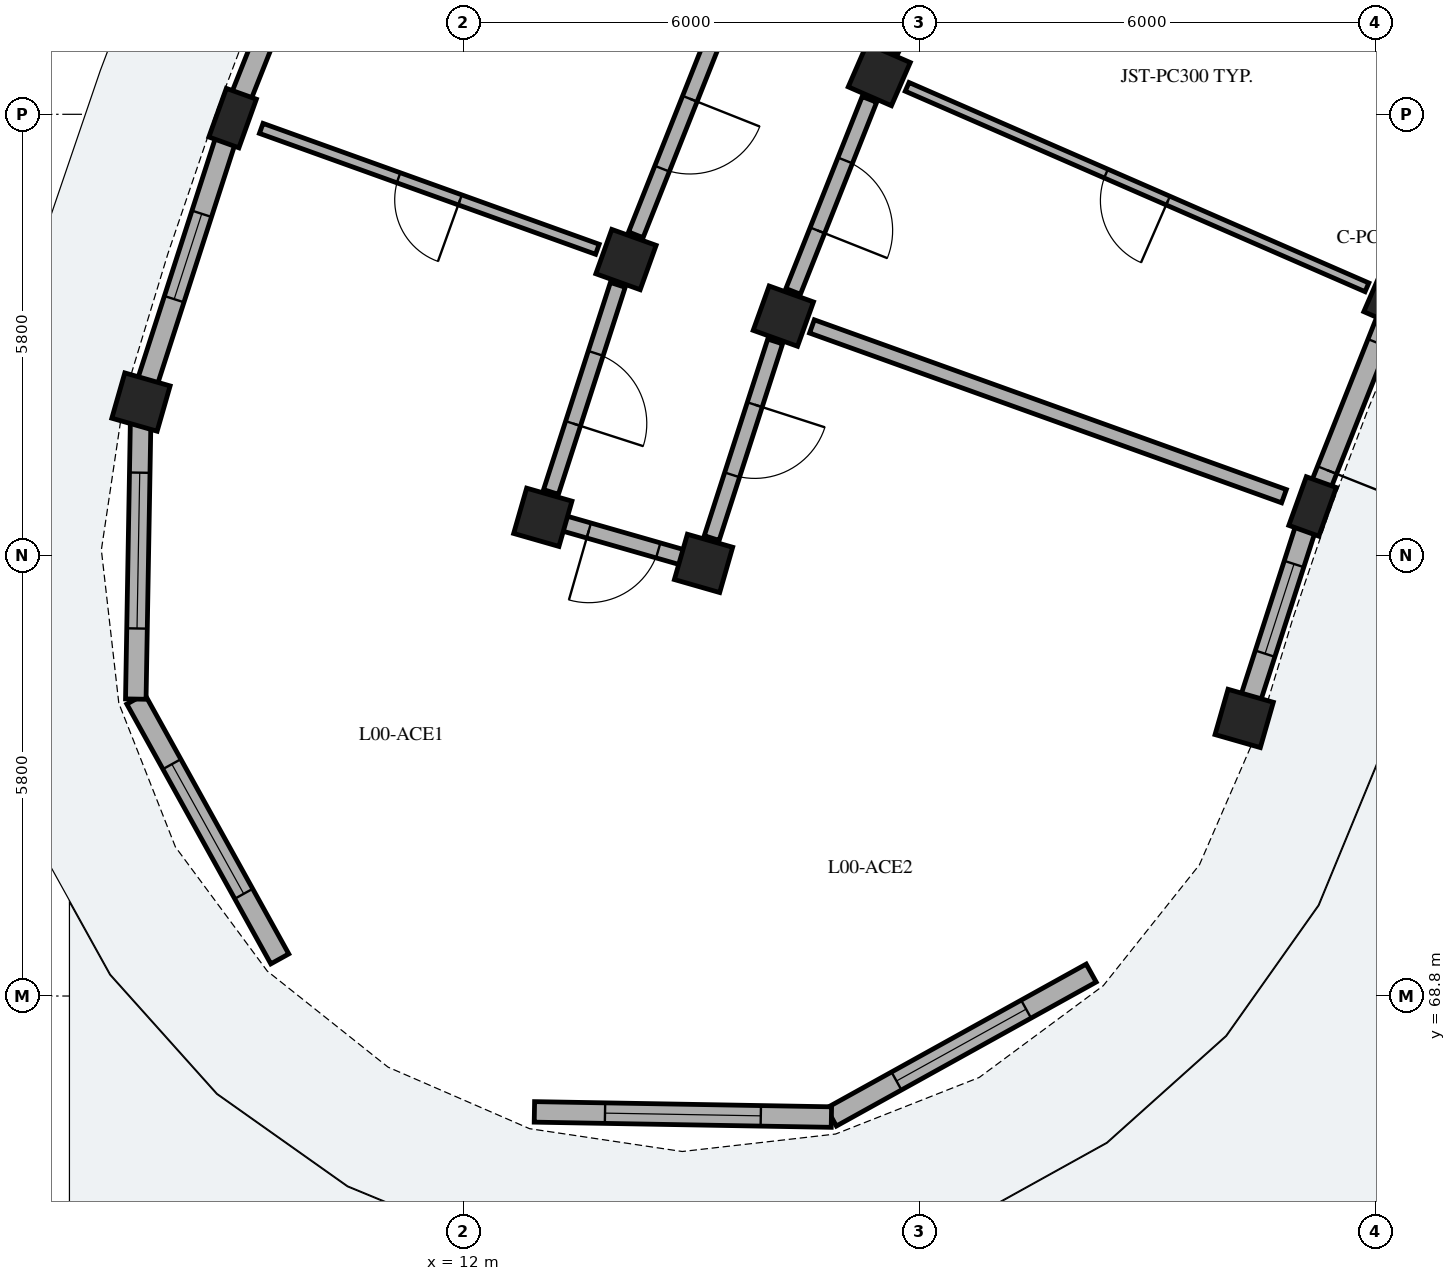
"""IFC4 building model, lengths in metres.
Left out: names, types, materials, properties, quantities, classifications, styles, units other than length and angle.
Written with IfcOpenShell. Run it as: python <this file> out.ifc"""

import sys

from ifc_helpers import new_model, si_unit, direction, frame, frame_2d, origin, origin_2d, place, context, subcontext, project, spatial, rectangle, extrude, element, fill, save


model = new_model("IFC4")
c1 = context("Model", 3, precision=1e-05, world=origin(), true_north=direction((0.0, 1.0)))
c2 = subcontext(c1, "Body", "Model", "MODEL_VIEW")
j1 = project(units=[si_unit("LENGTHUNIT", "METRE"), si_unit("PLANEANGLEUNIT", "RADIAN")], contexts=[c1])
p1 = place(None, origin())
s1 = spatial("IfcSite", under=j1, at=p1, CompositionType="ELEMENT")
p2 = place(p1, origin())
s2 = spatial("IfcBuilding", under=s1, at=p2, CompositionType="ELEMENT")
p3 = place(p2, origin())
s3 = spatial("IfcBuildingStorey", under=s2, at=p3, CompositionType="ELEMENT", Elevation=0.0)
for number, where, z_axis, x_axis in (
    (1, (24.254, 77.964, 0.0), (0.0, 0.0, 1.0), (-0.917, 0.4, 0.0)),
    (2, (17.47, 80.921, 0.0), (0.0, 0.0, 1.0), (-0.917, 0.4, 0.0)),
):
    element("IfcColumn", number, at=place(p3, frame(where, z_axis=z_axis, x_axis=x_axis)), inside=s3, PredefinedType="COLUMN", context=c2, shape_type="SweptSolid", body=[
        extrude(rectangle(XDim=0.62, YDim=0.62, at=origin_2d()), origin(), (0.0, 0.0, 1.0), 4.485),
    ])
p4 = place(p3, frame((23.172, 75.241, 0.0), z_axis=(0.0, 0.0, 1.0), x_axis=(-0.941012100316, 0.338372911236, 0.0)))
e3 = element("IfcColumn", 3, at=p4, inside=s3, PredefinedType="PILASTER", context=c2, shape_type="SweptSolid", body=[
    extrude(rectangle(XDim=0.42, YDim=0.68, at=origin_2d()), origin(), (0.0, 0.0, 1.0), 4.485),
])
for number, where, z_axis, x_axis in (
    (4, (16.208, 77.745, 0.0), (0.0, 0.0, 1.0), (-0.941, 0.338, 0.0)),
    (5, (14.138, 78.489, 0.0), (0.0, 0.0, 1.0), (-0.941, 0.338, 0.0)),
):
    element("IfcColumn", number, at=place(p3, frame(where, z_axis=z_axis, x_axis=x_axis)), inside=s3, PredefinedType="COLUMN", context=c2, shape_type="SweptSolid", body=[
        extrude(rectangle(XDim=0.62, YDim=0.62, at=origin_2d()), origin(), (0.0, 0.0, 1.0), 4.485),
    ])
p5 = place(p3, frame((8.963, 80.35, 0.0), z_axis=(0.0, 0.0, 1.0), x_axis=(-0.941012100316, 0.338372911236, 0.0)))
e6 = element("IfcColumn", 6, at=p5, inside=s3, PredefinedType="PILASTER", context=c2, shape_type="SweptSolid", body=[
    extrude(rectangle(XDim=0.42, YDim=0.68, at=origin_2d()), origin(), (0.0, 0.0, 1.0), 4.485),
])
for number, where, z_axis, x_axis in (
    (7, (22.272, 72.452, 0.0), (0.0, 0.0, 1.0), (-0.961, 0.276, 0.0)),
    (8, (15.159, 74.492, 0.0), (0.0, 0.0, 1.0), (-0.961, 0.276, 0.0)),
    (9, (13.044, 75.098, 0.0), (0.0, 0.0, 1.0), (-0.961, 0.276, 0.0)),
    (10, (7.757, 76.614, 0.0), (0.0, 0.0, 1.0), (-0.961, 0.276, 0.0)),
):
    element("IfcColumn", number, at=place(p3, frame(where, z_axis=z_axis, x_axis=x_axis)), inside=s3, PredefinedType="COLUMN", context=c2, shape_type="SweptSolid", body=[
        extrude(rectangle(XDim=0.62, YDim=0.62, at=origin_2d()), origin(), (0.0, 0.0, 1.0), 4.485),
    ])
p6 = place(p3, frame((10.309, 83.738, 0.0), z_axis=(0.0, 0.0, 1.0), x_axis=(-0.369191330552, -0.929353410412, 0.0)))
e11 = element("IfcWall", 11, at=p6, inside=s3, PredefinedType="SOLIDWALL", context=c2, shape_type="SweptSolid", body=[
    extrude(rectangle(XDim=3.466, YDim=0.27, at=frame_2d((1.733, 0.0))), origin(), (0.0, 0.0, 1.0), 3.755),
])
p7 = place(p6, frame((0.858, 0.0, 0.55)))
e12 = element("IfcOpeningElement", 12, at=p7, cuts=e11, PredefinedType="OPENING", context=c2, shape_type="SweptSolid", body=[
    extrude(rectangle(XDim=1.75, YDim=1.85, at=frame_2d((0.875, 0.925))), frame((0.0, 0.145, 0.0), z_axis=(0.0, -1.0, 0.0), x_axis=(1.0, 0.0, 0.0)), (0.0, 0.0, 1.0), 0.29),
])
p8 = place(p3, frame((24.15, 77.704, 0.0), z_axis=(0.0, 0.0, 1.0), x_axis=(-0.369157243617, -0.929366950932, 0.0)))
e13 = element("IfcWall", 13, at=p8, inside=s3, PredefinedType="SOLIDWALL", context=c2, shape_type="SweptSolid", body=[
    extrude(rectangle(XDim=2.47, YDim=0.27, at=frame_2d((1.235, 0.0))), origin(), (0.0, 0.0, 1.0), 3.755),
])
p9 = place(p8, frame((0.335, 0.0, 0.0)))
e14 = element("IfcOpeningElement", 14, at=p9, cuts=e13, PredefinedType="OPENING", context=c2, shape_type="SweptSolid", body=[
    extrude(rectangle(XDim=1.8, YDim=2.15, at=frame_2d((0.9, 1.075))), frame((0.0, 0.145, 0.0), z_axis=(0.0, -1.0, 0.0), x_axis=(1.0, 0.0, 0.0)), (0.0, 0.0, 1.0), 0.29),
])
p10 = place(p3, frame((8.907, 80.179, 0.0), z_axis=(0.0, 0.0, 1.0), x_axis=(-0.30721065507, -0.951641536195, 0.0)))
e15 = element("IfcWall", 15, at=p10, inside=s3, PredefinedType="SOLIDWALL", context=c2, shape_type="SweptSolid", body=[
    extrude(rectangle(XDim=3.466, YDim=0.27, at=frame_2d((1.733, 0.0))), origin(), (0.0, 0.0, 1.0), 3.755),
])
p11 = place(p10, frame((1.143, 0.0, 0.55)))
e16 = element("IfcOpeningElement", 16, at=p11, cuts=e15, PredefinedType="OPENING", context=c2, shape_type="SweptSolid", body=[
    extrude(rectangle(XDim=1.18, YDim=1.48, at=frame_2d((0.59, 0.74))), frame((0.0, 0.145, 0.0), z_axis=(0.0, -1.0, 0.0), x_axis=(1.0, 0.0, 0.0)), (0.0, 0.0, 1.0), 0.29),
])
p12 = place(p3, frame((23.117, 75.069, 0.0), z_axis=(0.0, 0.0, 1.0), x_axis=(-0.307170258834, -0.951654576035, 0.0)))
e17 = element("IfcWall", 17, at=p12, inside=s3, PredefinedType="SOLIDWALL", context=c2, shape_type="SweptSolid", body=[
    extrude(rectangle(XDim=2.47, YDim=0.27, at=frame_2d((1.235, 0.0))), origin(), (0.0, 0.0, 1.0), 3.755),
])
p13 = place(p12, frame((0.615, 0.0, 0.55)))
e18 = element("IfcOpeningElement", 18, at=p13, cuts=e17, PredefinedType="OPENING", context=c2, shape_type="SweptSolid", body=[
    extrude(rectangle(XDim=1.24, YDim=1.535, at=frame_2d((0.62, 0.768))), frame((0.0, 0.145, 0.0), z_axis=(0.0, -1.0, 0.0), x_axis=(1.0, 0.0, 0.0)), (0.0, 0.0, 1.0), 0.29),
])
p14 = place(p3, frame((20.259, 69.102, 0.0), z_axis=(0.0, 0.0, 1.0), x_axis=(-0.874643043537, -0.484767517881, 0.0)))
e19 = element("IfcWall", 19, at=p14, inside=s3, PredefinedType="SOLIDWALL", context=c2, shape_type="SweptSolid", body=[
    extrude(rectangle(XDim=3.908, YDim=0.27, at=frame_2d((1.954, 0.0))), origin(), (0.0, 0.0, 1.0), 3.755),
])
p15 = place(p14, frame((0.979, 0.0, 0.4)))
e20 = element("IfcOpeningElement", 20, at=p15, cuts=e19, PredefinedType="OPENING", context=c2, shape_type="SweptSolid", body=[
    extrude(rectangle(XDim=1.95, YDim=1.78, at=frame_2d((0.975, 0.89))), frame((0.0, 0.145, 0.0), z_axis=(0.0, -1.0, 0.0), x_axis=(1.0, 0.0, 0.0)), (0.0, 0.0, 1.0), 0.29),
])
p16 = place(p3, frame((16.841, 67.208, 0.0), z_axis=(0.0, 0.0, 1.0), x_axis=(-0.999848096392, 0.017429404492, 0.0)))
e21 = element("IfcWall", 21, at=p16, inside=s3, PredefinedType="SOLIDWALL", context=c2, shape_type="SweptSolid", body=[
    extrude(rectangle(XDim=3.908, YDim=0.27, at=frame_2d((1.954, 0.0))), origin(), (0.0, 0.0, 1.0), 3.755),
])
p17 = place(p16, frame((0.929, 0.0, 0.4)))
e22 = element("IfcOpeningElement", 22, at=p17, cuts=e21, PredefinedType="OPENING", context=c2, shape_type="SweptSolid", body=[
    extrude(rectangle(XDim=2.05, YDim=1.82, at=frame_2d((1.025, 0.91))), frame((0.0, 0.145, 0.0), z_axis=(0.0, -1.0, 0.0), x_axis=(1.0, 0.0, 0.0)), (0.0, 0.0, 1.0), 0.29),
])
p18 = place(p3, frame((9.583, 69.289, 0.0), z_axis=(0.0, 0.0, 1.0), x_axis=(-0.484841794757, 0.874601871743, 0.0)))
e23 = element("IfcWall", 23, at=p18, inside=s3, PredefinedType="SOLIDWALL", context=c2, shape_type="SweptSolid", body=[
    extrude(rectangle(XDim=3.908, YDim=0.27, at=frame_2d((1.954, 0.0))), origin(), (0.0, 0.0, 1.0), 3.755),
])
p19 = place(p18, frame((0.979, 0.0, 0.4)))
e24 = element("IfcOpeningElement", 24, at=p19, cuts=e23, PredefinedType="OPENING", context=c2, shape_type="SweptSolid", body=[
    extrude(rectangle(XDim=1.95, YDim=1.78, at=frame_2d((0.975, 0.89))), frame((0.0, 0.145, 0.0), z_axis=(0.0, -1.0, 0.0), x_axis=(1.0, 0.0, 0.0)), (0.0, 0.0, 1.0), 0.29),
])
p20 = place(p3, frame((7.689, 72.707, 0.0), z_axis=(0.0, 0.0, 1.0), x_axis=(0.017428315893, 0.999848115368, 0.0)))
e25 = element("IfcWall", 25, at=p20, inside=s3, PredefinedType="SOLIDWALL", context=c2, shape_type="SweptSolid", body=[
    extrude(rectangle(XDim=3.908, YDim=0.27, at=frame_2d((1.954, 0.0))), origin(), (0.0, 0.0, 1.0), 3.755),
])
p21 = place(p20, frame((0.929, 0.0, 0.4)))
e26 = element("IfcOpeningElement", 26, at=p21, cuts=e25, PredefinedType="OPENING", context=c2, shape_type="SweptSolid", body=[
    extrude(rectangle(XDim=2.05, YDim=1.82, at=frame_2d((1.025, 0.91))), frame((0.0, 0.145, 0.0), z_axis=(0.0, -1.0, 0.0), x_axis=(1.0, 0.0, 0.0)), (0.0, 0.0, 1.0), 0.29),
])
p22 = place(p3, frame((18.789, 83.692, 0.0), z_axis=(0.0, 0.0, 1.0), x_axis=(-0.429630211913, -0.90300491749, 0.0)))
e27 = element("IfcWall", 27, at=p22, inside=s3, PredefinedType="PARTITIONING", context=c2, shape_type="SweptSolid", body=[
    extrude(rectangle(XDim=2.718, YDim=0.205, at=frame_2d((1.359, 0.0))), origin(), (0.0, 0.0, 1.0), 3.1),
])
p23 = place(p22, frame((0.894, 0.0, 0.0)))
e28 = element("IfcOpeningElement", 28, at=p23, cuts=e27, PredefinedType="OPENING", context=c2, shape_type="SweptSolid", body=[
    extrude(rectangle(XDim=0.93, YDim=2.12, at=frame_2d((0.465, 1.06))), frame((0.0, 0.113, 0.0), z_axis=(0.0, -1.0, 0.0), x_axis=(1.0, 0.0, 0.0)), (0.0, 0.0, 1.0), 0.225),
])
p24 = place(p3, frame((23.887, 78.124, 0.0), z_axis=(0.0, 0.0, 1.0), x_axis=(-0.916668515796, 0.399648385645, 0.0)))
e29 = element("IfcWall", 29, at=p24, inside=s3, PredefinedType="PARTITIONING", context=c2, shape_type="SweptSolid", body=[
    extrude(rectangle(XDim=6.6, YDim=0.125, at=frame_2d((3.3, 0.0))), origin(), (0.0, 0.0, 1.0), 3.1),
])
p25 = place(p24, frame((2.855, 0.0, 0.0)))
e30 = element("IfcOpeningElement", 30, at=p25, cuts=e29, PredefinedType="OPENING", context=c2, shape_type="SweptSolid", body=[
    extrude(rectangle(XDim=0.89, YDim=2.1, at=frame_2d((0.445, 1.05))), frame((0.0, 0.073, 0.0), z_axis=(0.0, -1.0, 0.0), x_axis=(1.0, 0.0, 0.0)), (0.0, 0.0, 1.0), 0.145),
])
p26 = place(p3, frame((15.325, 81.475, 0.0), z_axis=(0.0, 0.0, 1.0), x_axis=(-0.369213832442, -0.929344471083, 0.0)))
e31 = element("IfcWall", 31, at=p26, inside=s3, PredefinedType="PARTITIONING", context=c2, shape_type="SweptSolid", body=[
    extrude(rectangle(XDim=2.863, YDim=0.205, at=frame_2d((1.432, 0.0))), origin(), (0.0, 0.0, 1.0), 3.1),
])
p27 = place(p26, frame((0.937, 0.0, 0.0)))
e32 = element("IfcOpeningElement", 32, at=p27, cuts=e31, PredefinedType="OPENING", context=c2, shape_type="SweptSolid", body=[
    extrude(rectangle(XDim=0.99, YDim=2.16, at=frame_2d((0.495, 1.08))), frame((0.0, 0.113, 0.0), z_axis=(0.0, -1.0, 0.0), x_axis=(1.0, 0.0, 0.0)), (0.0, 0.0, 1.0), 0.225),
])
p28 = place(p3, frame((17.341, 80.596, 0.0), z_axis=(0.0, 0.0, 1.0), x_axis=(-0.369237170461, -0.929335198919, 0.0)))
e33 = element("IfcWall", 33, at=p28, inside=s3, PredefinedType="PARTITIONING", context=c2, shape_type="SweptSolid", body=[
    extrude(rectangle(XDim=2.718, YDim=0.205, at=frame_2d((1.359, 0.0))), origin(), (0.0, 0.0, 1.0), 3.1),
])
p29 = place(p28, frame((0.864, 0.0, 0.0)))
e34 = element("IfcOpeningElement", 34, at=p29, cuts=e33, PredefinedType="OPENING", context=c2, shape_type="SweptSolid", body=[
    extrude(rectangle(XDim=0.99, YDim=2.16, at=frame_2d((0.495, 1.08))), frame((0.0, 0.113, 0.0), z_axis=(0.0, -1.0, 0.0), x_axis=(1.0, 0.0, 0.0)), (0.0, 0.0, 1.0), 0.225),
])
p30 = place(p3, frame((13.762, 78.625, 0.0), z_axis=(0.0, 0.0, 1.0), x_axis=(-0.941015806044, 0.338362605463, 0.0)))
e35 = element("IfcWall", 35, at=p30, inside=s3, PredefinedType="PLUMBINGWALL", context=c2, shape_type="SweptSolid", body=[
    extrude(rectangle(XDim=4.7, YDim=0.14, at=frame_2d((2.35, 0.0))), origin(), (0.0, 0.0, 1.0), 3.1),
])
p31 = place(p30, frame((1.92, 0.0, 0.0)))
e36 = element("IfcOpeningElement", 36, at=p31, cuts=e35, PredefinedType="OPENING", context=c2, shape_type="SweptSolid", body=[
    extrude(rectangle(XDim=0.86, YDim=2.06, at=frame_2d((0.43, 1.03))), frame((0.0, 0.08, 0.0), z_axis=(0.0, -1.0, 0.0), x_axis=(1.0, 0.0, 0.0)), (0.0, 0.0, 1.0), 0.16),
])
p32 = place(p3, frame((22.796, 75.376, 0.0), z_axis=(0.0, 0.0, 1.0), x_axis=(-0.941005714099, 0.338390670725, 0.0)))
e37 = element("IfcWall", 37, at=p32, inside=s3, PredefinedType="PARTITIONING", context=c2, shape_type="SweptSolid", body=[
    extrude(rectangle(XDim=6.6, YDim=0.185, at=frame_2d((3.3, 0.0))), origin(), (0.0, 0.0, 1.0), 3.1),
])
p33 = place(p3, frame((14.031, 78.156, 0.0), z_axis=(0.0, 0.0, 1.0), x_axis=(-0.307132325305, -0.951666819193, 0.0)))
e38 = element("IfcWall", 38, at=p33, inside=s3, PredefinedType="PARTITIONING", context=c2, shape_type="SweptSolid", body=[
    extrude(rectangle(XDim=2.863, YDim=0.205, at=frame_2d((1.432, 0.0))), origin(), (0.0, 0.0, 1.0), 3.1),
])
p34 = place(p33, frame((0.947, 0.0, 0.0)))
e39 = element("IfcOpeningElement", 39, at=p34, cuts=e38, PredefinedType="OPENING", context=c2, shape_type="SweptSolid", body=[
    extrude(rectangle(XDim=0.97, YDim=2.15, at=frame_2d((0.485, 1.075))), frame((0.0, 0.113, 0.0), z_axis=(0.0, -1.0, 0.0), x_axis=(1.0, 0.0, 0.0)), (0.0, 0.0, 1.0), 0.225),
])
p35 = place(p3, frame((16.101, 77.412, 0.0), z_axis=(0.0, 0.0, 1.0), x_axis=(-0.307186478934, -0.95164934044, 0.0)))
e40 = element("IfcWall", 40, at=p35, inside=s3, PredefinedType="PARTITIONING", context=c2, shape_type="SweptSolid", body=[
    extrude(rectangle(XDim=2.718, YDim=0.205, at=frame_2d((1.359, 0.0))), origin(), (0.0, 0.0, 1.0), 3.1),
])
p36 = place(p35, frame((0.874, 0.0, 0.0)))
e41 = element("IfcOpeningElement", 41, at=p36, cuts=e40, PredefinedType="OPENING", context=c2, shape_type="SweptSolid", body=[
    extrude(rectangle(XDim=0.97, YDim=2.15, at=frame_2d((0.485, 1.075))), frame((0.0, 0.113, 0.0), z_axis=(0.0, -1.0, 0.0), x_axis=(1.0, 0.0, 0.0)), (0.0, 0.0, 1.0), 0.225),
])
p37 = place(p3, frame((15.111, 74.506, 0.0), z_axis=(0.0, 0.0, 1.0), x_axis=(-0.961264701934, 0.275626872449, 0.0)))
e42 = element("IfcWall", 42, at=p37, inside=s3, PredefinedType="PARTITIONING", context=c2, shape_type="SweptSolid", body=[
    extrude(rectangle(XDim=2.1, YDim=0.205, at=frame_2d((1.05, 0.0))), origin(), (0.0, 0.0, 1.0), 3.1),
])
p38 = place(p37, frame((0.57, 0.0, 0.0)))
e43 = element("IfcOpeningElement", 43, at=p38, cuts=e42, PredefinedType="OPENING", context=c2, shape_type="SweptSolid", body=[
    extrude(rectangle(XDim=0.95, YDim=2.13, at=frame_2d((0.475, 1.065))), frame((0.0, 0.113, 0.0), z_axis=(0.0, -1.0, 0.0), x_axis=(1.0, 0.0, 0.0)), (0.0, 0.0, 1.0), 0.225),
])
p39 = place(p9, origin())
e44 = element("IfcDoor", 44, at=p39, inside=s3, OperationType="DOUBLE_DOOR_SINGLE_SWING", PredefinedType="DOOR", context=c2, shape_type="SweptSolid", body=[
    extrude(rectangle(XDim=1.8, YDim=2.15, at=frame_2d((0.9, 1.075))), frame((0.0, 0.025, 0.0), z_axis=(0.0, -1.0, 0.0), x_axis=(1.0, 0.0, 0.0)), (0.0, 0.0, 1.0), 0.05),
])
fill(e14, e44)
p40 = place(p11, origin())
e45 = element("IfcWindow", 45, at=p40, inside=s3, PartitioningType="SINGLE_PANEL", PredefinedType="WINDOW", context=c2, shape_type="SweptSolid", body=[
    extrude(rectangle(XDim=1.18, YDim=1.48, at=frame_2d((0.59, 0.74))), frame((0.0, 0.03, 0.0), z_axis=(0.0, -1.0, 0.0), x_axis=(1.0, 0.0, 0.0)), (0.0, 0.0, 1.0), 0.06),
])
fill(e16, e45)
p41 = place(p13, origin())
e46 = element("IfcWindow", 46, at=p41, inside=s3, PartitioningType="SINGLE_PANEL", PredefinedType="WINDOW", context=c2, shape_type="SweptSolid", body=[
    extrude(rectangle(XDim=1.24, YDim=1.535, at=frame_2d((0.62, 0.768))), frame((0.0, 0.03, 0.0), z_axis=(0.0, -1.0, 0.0), x_axis=(1.0, 0.0, 0.0)), (0.0, 0.0, 1.0), 0.06),
])
fill(e18, e46)
p42 = place(p15, origin())
e47 = element("IfcWindow", 47, at=p42, inside=s3, PartitioningType="SINGLE_PANEL", PredefinedType="WINDOW", context=c2, shape_type="SweptSolid", body=[
    extrude(rectangle(XDim=1.95, YDim=1.78, at=frame_2d((0.975, 0.89))), frame((0.0, 0.03, 0.0), z_axis=(0.0, -1.0, 0.0), x_axis=(1.0, 0.0, 0.0)), (0.0, 0.0, 1.0), 0.06),
])
fill(e20, e47)
p43 = place(p17, origin())
e48 = element("IfcWindow", 48, at=p43, inside=s3, PartitioningType="SINGLE_PANEL", PredefinedType="WINDOW", context=c2, shape_type="SweptSolid", body=[
    extrude(rectangle(XDim=2.05, YDim=1.82, at=frame_2d((1.025, 0.91))), frame((0.0, 0.03, 0.0), z_axis=(0.0, -1.0, 0.0), x_axis=(1.0, 0.0, 0.0)), (0.0, 0.0, 1.0), 0.06),
])
fill(e22, e48)
p44 = place(p19, origin())
e49 = element("IfcWindow", 49, at=p44, inside=s3, PartitioningType="SINGLE_PANEL", PredefinedType="WINDOW", context=c2, shape_type="SweptSolid", body=[
    extrude(rectangle(XDim=1.95, YDim=1.78, at=frame_2d((0.975, 0.89))), frame((0.0, 0.03, 0.0), z_axis=(0.0, -1.0, 0.0), x_axis=(1.0, 0.0, 0.0)), (0.0, 0.0, 1.0), 0.06),
])
fill(e24, e49)
p45 = place(p21, origin())
e50 = element("IfcWindow", 50, at=p45, inside=s3, PartitioningType="SINGLE_PANEL", PredefinedType="WINDOW", context=c2, shape_type="SweptSolid", body=[
    extrude(rectangle(XDim=2.05, YDim=1.82, at=frame_2d((1.025, 0.91))), frame((0.0, 0.03, 0.0), z_axis=(0.0, -1.0, 0.0), x_axis=(1.0, 0.0, 0.0)), (0.0, 0.0, 1.0), 0.06),
])
fill(e26, e50)
p46 = place(p25, origin())
e51 = element("IfcDoor", 51, at=p46, inside=s3, OperationType="SINGLE_SWING_LEFT", PredefinedType="DOOR", context=c2, shape_type="SweptSolid", body=[
    extrude(rectangle(XDim=0.89, YDim=2.1, at=frame_2d((0.445, 1.05))), frame((0.0, 0.025, 0.0), z_axis=(0.0, -1.0, 0.0), x_axis=(1.0, 0.0, 0.0)), (0.0, 0.0, 1.0), 0.05),
])
fill(e30, e51)
p47 = place(p27, origin())
e52 = element("IfcDoor", 52, at=p47, inside=s3, OperationType="SINGLE_SWING_LEFT", PredefinedType="DOOR", context=c2, shape_type="SweptSolid", body=[
    extrude(rectangle(XDim=0.99, YDim=2.16, at=frame_2d((0.495, 1.08))), frame((0.0, 0.025, 0.0), z_axis=(0.0, -1.0, 0.0), x_axis=(1.0, 0.0, 0.0)), (0.0, 0.0, 1.0), 0.05),
])
fill(e32, e52)
p48 = place(p29, origin())
e53 = element("IfcDoor", 53, at=p48, inside=s3, OperationType="SINGLE_SWING_RIGHT", PredefinedType="DOOR", context=c2, shape_type="SweptSolid", body=[
    extrude(rectangle(XDim=0.99, YDim=2.16, at=frame_2d((0.495, 1.08))), frame((0.0, 0.025, 0.0), z_axis=(0.0, -1.0, 0.0), x_axis=(1.0, 0.0, 0.0)), (0.0, 0.0, 1.0), 0.05),
])
fill(e34, e53)
p49 = place(p31, origin())
e54 = element("IfcDoor", 54, at=p49, inside=s3, OperationType="SINGLE_SWING_LEFT", PredefinedType="DOOR", context=c2, shape_type="SweptSolid", body=[
    extrude(rectangle(XDim=0.86, YDim=2.06, at=frame_2d((0.43, 1.03))), frame((0.0, 0.025, 0.0), z_axis=(0.0, -1.0, 0.0), x_axis=(1.0, 0.0, 0.0)), (0.0, 0.0, 1.0), 0.05),
])
fill(e36, e54)
p50 = place(p34, origin())
e55 = element("IfcDoor", 55, at=p50, inside=s3, OperationType="SINGLE_SWING_RIGHT", PredefinedType="DOOR", context=c2, shape_type="SweptSolid", body=[
    extrude(rectangle(XDim=0.97, YDim=2.15, at=frame_2d((0.485, 1.075))), frame((0.0, 0.025, 0.0), z_axis=(0.0, -1.0, 0.0), x_axis=(1.0, 0.0, 0.0)), (0.0, 0.0, 1.0), 0.05),
])
fill(e39, e55)
p51 = place(p36, origin())
e56 = element("IfcDoor", 56, at=p51, inside=s3, OperationType="SINGLE_SWING_LEFT", PredefinedType="DOOR", context=c2, shape_type="SweptSolid", body=[
    extrude(rectangle(XDim=0.97, YDim=2.15, at=frame_2d((0.485, 1.075))), frame((0.0, 0.025, 0.0), z_axis=(0.0, -1.0, 0.0), x_axis=(1.0, 0.0, 0.0)), (0.0, 0.0, 1.0), 0.05),
])
fill(e41, e56)
p52 = place(p38, origin())
e57 = element("IfcDoor", 57, at=p52, inside=s3, OperationType="SINGLE_SWING_RIGHT", PredefinedType="DOOR", context=c2, shape_type="SweptSolid", body=[
    extrude(rectangle(XDim=0.95, YDim=2.13, at=frame_2d((0.475, 1.065))), frame((0.0, 0.025, 0.0), z_axis=(0.0, -1.0, 0.0), x_axis=(1.0, 0.0, 0.0)), (0.0, 0.0, 1.0), 0.05),
])
fill(e43, e57)
save(model, sys.argv[1])
